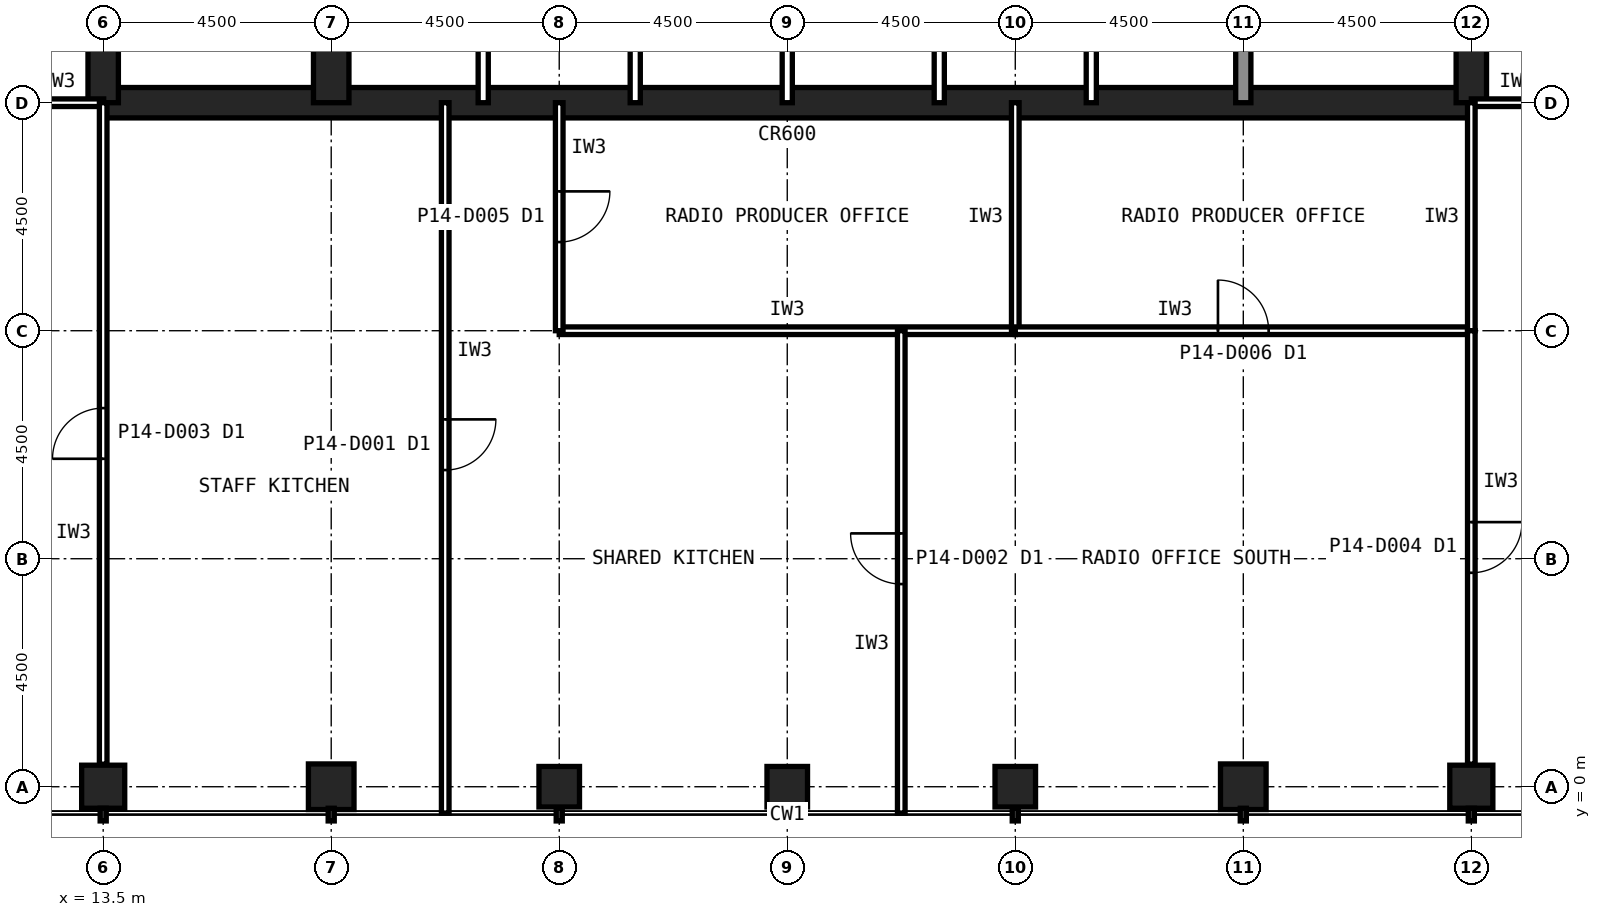
"""IFC4 building model, lengths in metres.
Left out: names, types, materials, properties, quantities, classifications, styles, units other than length and angle.
Written with IfcOpenShell. Run it as: python <this file> out.ifc"""

import sys

from ifc_helpers import new_model, si_unit, direction, frame, frame_2d, origin, origin_2d, place, context, subcontext, project, spatial, rectangle, hollow_rectangle, extrude, element, fill, save


model = new_model("IFC4")
c1 = context("Model", 3, precision=1e-05, world=origin(), true_north=direction((0.0, 1.0)))
c2 = subcontext(c1, "Body", "Model", "MODEL_VIEW")
j1 = project(units=[si_unit("LENGTHUNIT", "METRE"), si_unit("PLANEANGLEUNIT", "RADIAN")], contexts=[c1])
p1 = place(None, origin())
s1 = spatial("IfcSite", under=j1, at=p1, CompositionType="ELEMENT")
p2 = place(p1, origin())
s2 = spatial("IfcBuilding", under=s1, at=p2, CompositionType="ELEMENT")
p3 = place(p2, frame((0.0, 0.0, 62.6)))
s3 = spatial("IfcBuildingStorey", under=s2, at=p3, CompositionType="ELEMENT", Elevation=62.6)
p4 = place(p3, frame((13.5, 0.0, 0.0), z_axis=(0.0, 0.0, 1.0), x_axis=(1.0, 0.0, 0.0)))
e1 = element("IfcColumn", 1, at=p4, inside=s3, PredefinedType="COLUMN", context=c2, shape_type="SweptSolid", body=[
    extrude(hollow_rectangle(XDim=0.85, YDim=0.85, WallThickness=0.05, at=origin_2d()), origin(), (0.0, 0.0, 1.0), 4.2),
])
p5 = place(p3, frame((18.0, 0.0, 0.0), z_axis=(0.0, 0.0, 1.0), x_axis=(1.0, 0.0, 0.0)))
e2 = element("IfcColumn", 2, at=p5, inside=s3, PredefinedType="COLUMN", context=c2, shape_type="SweptSolid", body=[
    extrude(hollow_rectangle(XDim=0.9, YDim=0.9, WallThickness=0.063, at=origin_2d()), origin(), (0.0, 0.0, 1.0), 4.2),
])
for number, where, z_axis, x_axis in (
    (3, (22.5, 0.0, 0.0), (0.0, 0.0, 1.0), (1.0, 0.0, 0.0)),
    (4, (27.0, 0.0, 0.0), (0.0, 0.0, 1.0), (1.0, 0.0, 0.0)),
    (5, (31.5, 0.0, 0.0), (0.0, 0.0, 1.0), (1.0, 0.0, 0.0)),
):
    element("IfcColumn", number, at=place(p3, frame(where, z_axis=z_axis, x_axis=x_axis)), inside=s3, PredefinedType="COLUMN", context=c2, shape_type="SweptSolid", body=[
        extrude(hollow_rectangle(XDim=0.8, YDim=0.8, WallThickness=0.045, at=origin_2d()), origin(), (0.0, 0.0, 1.0), 4.2),
    ])
p6 = place(p3, frame((36.0, 0.0, 0.0), z_axis=(0.0, 0.0, 1.0), x_axis=(1.0, 0.0, 0.0)))
e6 = element("IfcColumn", 6, at=p6, inside=s3, PredefinedType="COLUMN", context=c2, shape_type="SweptSolid", body=[
    extrude(hollow_rectangle(XDim=0.9, YDim=0.9, WallThickness=0.063, at=origin_2d()), origin(), (0.0, 0.0, 1.0), 4.2),
])
p7 = place(p3, frame((40.5, 0.0, 0.0), z_axis=(0.0, 0.0, 1.0), x_axis=(1.0, 0.0, 0.0)))
e7 = element("IfcColumn", 7, at=p7, inside=s3, PredefinedType="COLUMN", context=c2, shape_type="SweptSolid", body=[
    extrude(hollow_rectangle(XDim=0.85, YDim=0.85, WallThickness=0.05, at=origin_2d()), origin(), (0.0, 0.0, 1.0), 4.2),
])
p8 = place(p3, frame((13.5, 13.5, 0.0), z_axis=(0.0, 0.0, 1.0), x_axis=(1.0, 0.0, 0.0)))
e8 = element("IfcWall", 8, at=p8, inside=s3, PredefinedType="SHEAR", context=c2, shape_type="SweptSolid", body=[
    extrude(rectangle(XDim=27.0, YDim=0.6, at=frame_2d((13.5, 0.0))), origin(), (0.0, 0.0, 1.0), 4.2),
])
p9 = place(p3, frame((40.5, 13.5, 0.0), z_axis=(0.0, 0.0, 1.0), x_axis=(0.0, 1.0, 0.0)))
e9 = element("IfcWall", 9, at=p9, inside=s3, PredefinedType="SHEAR", context=c2, shape_type="SweptSolid", body=[
    extrude(rectangle(XDim=27.0, YDim=0.6, at=frame_2d((13.5, 0.0))), origin(), (0.0, 0.0, 1.0), 4.2),
])
p10 = place(p9, frame((5.85, 0.0, 0.0)))
e10 = element("IfcOpeningElement", 10, at=p10, cuts=e9, PredefinedType="OPENING", context=c2, shape_type="SweptSolid", body=[
    extrude(rectangle(XDim=1.8, YDim=2.1, at=frame_2d((0.9, 1.05))), frame((0.0, 0.31, 0.0), z_axis=(0.0, -1.0, 0.0), x_axis=(1.0, 0.0, 0.0)), (0.0, 0.0, 1.0), 0.62),
])
p11 = place(p9, frame((19.65, 0.0, 0.0)))
e11 = element("IfcOpeningElement", 11, at=p11, cuts=e9, PredefinedType="OPENING", context=c2, shape_type="SweptSolid", body=[
    extrude(rectangle(XDim=1.2, YDim=2.1, at=frame_2d((0.6, 1.05))), frame((0.0, 0.31, 0.0), z_axis=(0.0, -1.0, 0.0), x_axis=(1.0, 0.0, 0.0)), (0.0, 0.0, 1.0), 0.62),
])
p12 = place(p3, frame((13.5, 40.5, 0.0), z_axis=(0.0, 0.0, 1.0), x_axis=(0.0, -1.0, 0.0)))
e12 = element("IfcWall", 12, at=p12, inside=s3, PredefinedType="SHEAR", context=c2, shape_type="SweptSolid", body=[
    extrude(rectangle(XDim=27.0, YDim=0.6, at=frame_2d((13.5, 0.0))), origin(), (0.0, 0.0, 1.0), 4.2),
])
p13 = place(p12, frame((19.65, 0.0, 0.0)))
e13 = element("IfcOpeningElement", 13, at=p13, cuts=e12, PredefinedType="OPENING", context=c2, shape_type="SweptSolid", body=[
    extrude(rectangle(XDim=1.2, YDim=2.1, at=frame_2d((0.6, 1.05))), frame((0.0, 0.31, 0.0), z_axis=(0.0, -1.0, 0.0), x_axis=(1.0, 0.0, 0.0)), (0.0, 0.0, 1.0), 0.62),
])
p14 = place(p12, frame((5.85, 0.0, 0.0)))
e14 = element("IfcOpeningElement", 14, at=p14, cuts=e12, PredefinedType="OPENING", context=c2, shape_type="SweptSolid", body=[
    extrude(rectangle(XDim=1.8, YDim=2.1, at=frame_2d((0.9, 1.05))), frame((0.0, 0.31, 0.0), z_axis=(0.0, -1.0, 0.0), x_axis=(1.0, 0.0, 0.0)), (0.0, 0.0, 1.0), 0.62),
])
p15 = place(p3, frame((18.0, 13.5, 0.0), z_axis=(0.0, 0.0, 1.0), x_axis=(0.0, 1.0, 0.0)))
e15 = element("IfcWall", 15, at=p15, inside=s3, PredefinedType="SHEAR", context=c2, shape_type="SweptSolid", body=[
    extrude(rectangle(XDim=18.0, YDim=0.7, at=frame_2d((9.0, 0.0))), origin(), (0.0, 0.0, 1.0), 4.2),
])
p16 = place(p3, frame((36.0, 13.5, 0.0), z_axis=(0.0, 0.0, 1.0), x_axis=(0.0, 1.0, 0.0)))
e16 = element("IfcWall", 16, at=p16, inside=s3, PredefinedType="SOLIDWALL", context=c2, shape_type="SweptSolid", body=[
    extrude(rectangle(XDim=4.5, YDim=0.3, at=frame_2d((2.25, 0.0))), origin(), (0.0, 0.0, 1.0), 4.04),
])
for number, where, z_axis, x_axis in (
    (17, (21.0, 13.5, 0.0), (0.0, 0.0, 1.0), (0.0, 1.0, 0.0)),
    (18, (24.0, 13.5, 0.0), (0.0, 0.0, 1.0), (0.0, 1.0, 0.0)),
    (19, (27.0, 13.5, 0.0), (0.0, 0.0, 1.0), (0.0, 1.0, 0.0)),
    (20, (30.0, 13.5, 0.0), (0.0, 0.0, 1.0), (0.0, 1.0, 0.0)),
    (21, (33.0, 13.5, 0.0), (0.0, 0.0, 1.0), (0.0, 1.0, 0.0)),
):
    element("IfcWall", number, at=place(p3, frame(where, z_axis=z_axis, x_axis=x_axis)), inside=s3, PredefinedType="PARTITIONING", context=c2, shape_type="SweptSolid", body=[
        extrude(rectangle(XDim=4.5, YDim=0.2, at=frame_2d((2.25, 0.0))), origin(), (0.0, 0.0, 1.0), 4.04),
    ])
p17 = place(p3, frame((11.7, 13.5, 0.0), z_axis=(0.0, 0.0, 1.0), x_axis=(1.0, 0.0, 0.0)))
e22 = element("IfcWall", 22, at=p17, inside=s3, PredefinedType="PARTITIONING", context=c2, shape_type="SweptSolid", body=[
    extrude(rectangle(XDim=1.81, YDim=0.15, at=frame_2d((0.905, 0.0))), origin(), (0.0, 0.0, 1.0), 3.189),
])
p18 = place(p3, frame((40.5, 13.5, 0.0), z_axis=(0.0, 0.0, 1.0), x_axis=(1.0, 0.0, 0.0)))
e23 = element("IfcWall", 23, at=p18, inside=s3, PredefinedType="PARTITIONING", context=c2, shape_type="SweptSolid", body=[
    extrude(rectangle(XDim=1.8, YDim=0.15, at=frame_2d((0.9, 0.0))), origin(), (0.0, 0.0, 1.0), 3.189),
])
p19 = place(p3, frame((22.5, 9.0, 0.0), z_axis=(0.0, 0.0, 1.0), x_axis=(1.0, 0.0, 0.0)))
e24 = element("IfcWall", 24, at=p19, inside=s3, PredefinedType="PARTITIONING", context=c2, shape_type="SweptSolid", body=[
    extrude(rectangle(XDim=9.0, YDim=0.15, at=frame_2d((4.5, 0.0))), origin(), (0.0, 0.0, 1.0), 4.04),
])
p20 = place(p3, frame((31.5, 9.0, 0.0), z_axis=(0.0, 0.0, 1.0), x_axis=(0.0, 1.0, 0.0)))
e25 = element("IfcWall", 25, at=p20, inside=s3, PredefinedType="PARTITIONING", context=c2, shape_type="SweptSolid", body=[
    extrude(rectangle(XDim=4.5, YDim=0.15, at=frame_2d((2.25, 0.0))), origin(), (0.0, 0.0, 1.0), 3.189),
])
p21 = place(p3, frame((22.5, 13.5, 0.0), z_axis=(0.0, 0.0, 1.0), x_axis=(0.0, -1.0, 0.0)))
e26 = element("IfcWall", 26, at=p21, inside=s3, PredefinedType="PARTITIONING", context=c2, shape_type="SweptSolid", body=[
    extrude(rectangle(XDim=4.5, YDim=0.15, at=frame_2d((2.25, 0.0))), origin(), (0.0, 0.0, 1.0), 3.189),
])
p22 = place(p21, frame((1.75, 0.0, 0.0)))
e27 = element("IfcOpeningElement", 27, at=p22, cuts=e26, PredefinedType="OPENING", context=c2, shape_type="SweptSolid", body=[
    extrude(rectangle(XDim=1.0, YDim=2.1, at=frame_2d((0.5, 1.05))), frame((0.0, 0.085, 0.0), z_axis=(0.0, -1.0, 0.0), x_axis=(1.0, 0.0, 0.0)), (0.0, 0.0, 1.0), 0.17),
])
p23 = place(p3, frame((31.5, 9.0, 0.0), z_axis=(0.0, 0.0, 1.0), x_axis=(1.0, 0.0, 0.0)))
e28 = element("IfcWall", 28, at=p23, inside=s3, PredefinedType="PARTITIONING", context=c2, shape_type="SweptSolid", body=[
    extrude(rectangle(XDim=9.0, YDim=0.15, at=frame_2d((4.5, 0.0))), origin(), (0.0, 0.0, 1.0), 4.04),
])
p24 = place(p23, frame((4.0, 0.0, 0.0)))
e29 = element("IfcOpeningElement", 29, at=p24, cuts=e28, PredefinedType="OPENING", context=c2, shape_type="SweptSolid", body=[
    extrude(rectangle(XDim=1.0, YDim=2.1, at=frame_2d((0.5, 1.05))), frame((0.0, 0.085, 0.0), z_axis=(0.0, -1.0, 0.0), x_axis=(1.0, 0.0, 0.0)), (0.0, 0.0, 1.0), 0.17),
])
p25 = place(p3, frame((40.5, 9.0, 0.0), z_axis=(0.0, 0.0, 1.0), x_axis=(0.0, 1.0, 0.0)))
e30 = element("IfcWall", 30, at=p25, inside=s3, PredefinedType="PARTITIONING", context=c2, shape_type="SweptSolid", body=[
    extrude(rectangle(XDim=4.5, YDim=0.15, at=frame_2d((2.25, 0.0))), origin(), (0.0, 0.0, 1.0), 3.189),
])
p26 = place(p3, frame((40.5, 9.0, 0.0), z_axis=(0.0, 0.0, 1.0), x_axis=(0.0, -1.0, 0.0)))
e31 = element("IfcWall", 31, at=p26, inside=s3, PredefinedType="PARTITIONING", context=c2, shape_type="SweptSolid", body=[
    extrude(rectangle(XDim=8.555, YDim=0.15, at=frame_2d((4.277, 0.0))), origin(), (0.0, 0.0, 1.0), 3.189),
])
p27 = place(p26, frame((3.778, 0.0, 0.0)))
e32 = element("IfcOpeningElement", 32, at=p27, cuts=e31, PredefinedType="OPENING", context=c2, shape_type="SweptSolid", body=[
    extrude(rectangle(XDim=1.0, YDim=2.1, at=frame_2d((0.5, 1.05))), frame((0.0, 0.085, 0.0), z_axis=(0.0, -1.0, 0.0), x_axis=(1.0, 0.0, 0.0)), (0.0, 0.0, 1.0), 0.17),
])
p28 = place(p3, frame((29.25, -0.52, 0.0), z_axis=(0.0, 0.0, 1.0), x_axis=(0.0, 1.0, 0.0)))
e33 = element("IfcWall", 33, at=p28, inside=s3, PredefinedType="PARTITIONING", context=c2, shape_type="SweptSolid", body=[
    extrude(rectangle(XDim=9.52, YDim=0.15, at=frame_2d((4.76, 0.0))), origin(), (0.0, 0.0, 1.0), 4.04),
])
p29 = place(p28, frame((4.52, 0.0, 0.0)))
e34 = element("IfcOpeningElement", 34, at=p29, cuts=e33, PredefinedType="OPENING", context=c2, shape_type="SweptSolid", body=[
    extrude(rectangle(XDim=1.0, YDim=2.1, at=frame_2d((0.5, 1.05))), frame((0.0, 0.085, 0.0), z_axis=(0.0, -1.0, 0.0), x_axis=(1.0, 0.0, 0.0)), (0.0, 0.0, 1.0), 0.17),
])
p30 = place(p3, frame((20.25, 13.5, 0.0), z_axis=(0.0, 0.0, 1.0), x_axis=(0.0, -1.0, 0.0)))
e35 = element("IfcWall", 35, at=p30, inside=s3, PredefinedType="PARTITIONING", context=c2, shape_type="SweptSolid", body=[
    extrude(rectangle(XDim=14.02, YDim=0.15, at=frame_2d((7.01, 0.0))), origin(), (0.0, 0.0, 1.0), 4.04),
])
p31 = place(p30, frame((6.25, 0.0, 0.0)))
e36 = element("IfcOpeningElement", 36, at=p31, cuts=e35, PredefinedType="OPENING", context=c2, shape_type="SweptSolid", body=[
    extrude(rectangle(XDim=1.0, YDim=2.1, at=frame_2d((0.5, 1.05))), frame((0.0, 0.085, 0.0), z_axis=(0.0, -1.0, 0.0), x_axis=(1.0, 0.0, 0.0)), (0.0, 0.0, 1.0), 0.17),
])
p32 = place(p3, frame((13.5, 0.445, 0.0), z_axis=(0.0, 0.0, 1.0), x_axis=(0.0, 1.0, 0.0)))
e37 = element("IfcWall", 37, at=p32, inside=s3, PredefinedType="PARTITIONING", context=c2, shape_type="SweptSolid", body=[
    extrude(rectangle(XDim=13.055, YDim=0.15, at=frame_2d((6.527, 0.0))), origin(), (0.0, 0.0, 1.0), 3.189),
])
p33 = place(p32, frame((6.028, 0.0, 0.0)))
e38 = element("IfcOpeningElement", 38, at=p33, cuts=e37, PredefinedType="OPENING", context=c2, shape_type="SweptSolid", body=[
    extrude(rectangle(XDim=1.0, YDim=2.1, at=frame_2d((0.5, 1.05))), frame((0.0, 0.085, 0.0), z_axis=(0.0, -1.0, 0.0), x_axis=(1.0, 0.0, 0.0)), (0.0, 0.0, 1.0), 0.17),
])
p34 = place(p22, origin())
e39 = element("IfcDoor", 39, at=p34, inside=s3, OperationType="SINGLE_SWING_LEFT", PredefinedType="DOOR", context=c2, shape_type="SweptSolid", body=[
    extrude(rectangle(XDim=1.0, YDim=2.1, at=frame_2d((0.5, 1.05))), frame((0.0, 0.025, 0.0), z_axis=(0.0, -1.0, 0.0), x_axis=(1.0, 0.0, 0.0)), (0.0, 0.0, 1.0), 0.05),
])
fill(e27, e39)
p35 = place(p24, origin())
e40 = element("IfcDoor", 40, at=p35, inside=s3, OperationType="SINGLE_SWING_LEFT", PredefinedType="DOOR", context=c2, shape_type="SweptSolid", body=[
    extrude(rectangle(XDim=1.0, YDim=2.1, at=frame_2d((0.5, 1.05))), frame((0.0, 0.025, 0.0), z_axis=(0.0, -1.0, 0.0), x_axis=(1.0, 0.0, 0.0)), (0.0, 0.0, 1.0), 0.05),
])
fill(e29, e40)
p36 = place(p27, origin())
e41 = element("IfcDoor", 41, at=p36, inside=s3, OperationType="SINGLE_SWING_LEFT", PredefinedType="DOOR", context=c2, shape_type="SweptSolid", body=[
    extrude(rectangle(XDim=1.0, YDim=2.1, at=frame_2d((0.5, 1.05))), frame((0.0, 0.025, 0.0), z_axis=(0.0, -1.0, 0.0), x_axis=(1.0, 0.0, 0.0)), (0.0, 0.0, 1.0), 0.05),
])
fill(e32, e41)
p37 = place(p29, origin())
e42 = element("IfcDoor", 42, at=p37, inside=s3, OperationType="SINGLE_SWING_RIGHT", PredefinedType="DOOR", context=c2, shape_type="SweptSolid", body=[
    extrude(rectangle(XDim=1.0, YDim=2.1, at=frame_2d((0.5, 1.05))), frame((0.0, 0.025, 0.0), z_axis=(0.0, -1.0, 0.0), x_axis=(1.0, 0.0, 0.0)), (0.0, 0.0, 1.0), 0.05),
])
fill(e34, e42)
p38 = place(p31, origin())
e43 = element("IfcDoor", 43, at=p38, inside=s3, OperationType="SINGLE_SWING_LEFT", PredefinedType="DOOR", context=c2, shape_type="SweptSolid", body=[
    extrude(rectangle(XDim=1.0, YDim=2.1, at=frame_2d((0.5, 1.05))), frame((0.0, 0.025, 0.0), z_axis=(0.0, -1.0, 0.0), x_axis=(1.0, 0.0, 0.0)), (0.0, 0.0, 1.0), 0.05),
])
fill(e36, e43)
p39 = place(p33, origin())
e44 = element("IfcDoor", 44, at=p39, inside=s3, OperationType="SINGLE_SWING_LEFT", PredefinedType="DOOR", context=c2, shape_type="SweptSolid", body=[
    extrude(rectangle(XDim=1.0, YDim=2.1, at=frame_2d((0.5, 1.05))), frame((0.0, 0.025, 0.0), z_axis=(0.0, -1.0, 0.0), x_axis=(1.0, 0.0, 0.0)), (0.0, 0.0, 1.0), 0.05),
])
fill(e38, e44)
save(model, sys.argv[1])
